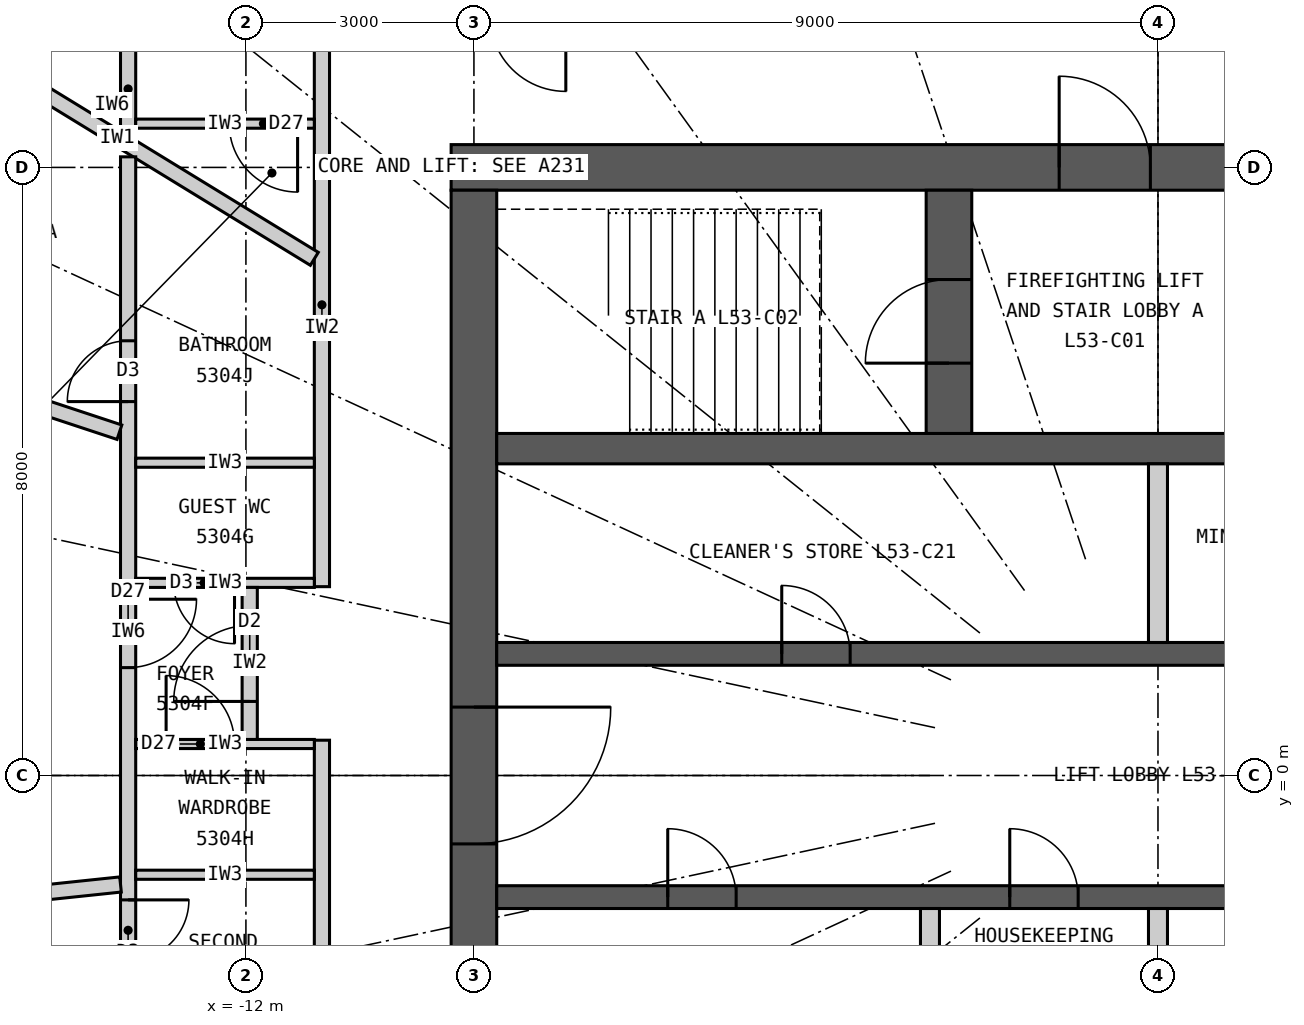
"""IFC4 building model, lengths in metres.
Left out: names, types, materials, properties, quantities, classifications, styles, units other than length and angle.
Written with IfcOpenShell. Run it as: python <this file> out.ifc"""

import sys

from ifc_helpers import new_model, si_unit, direction, frame, frame_2d, origin, place, context, subcontext, project, spatial, rectangle, extrude, element, fill, save


model = new_model("IFC4")
c1 = context("Model", 3, precision=1e-05, world=origin(), true_north=direction((0.0, 1.0)))
c2 = subcontext(c1, "Body", "Model", "MODEL_VIEW")
j1 = project(units=[si_unit("LENGTHUNIT", "METRE"), si_unit("PLANEANGLEUNIT", "RADIAN")], contexts=[c1])
p1 = place(None, origin())
s1 = spatial("IfcSite", under=j1, at=p1, CompositionType="ELEMENT")
p2 = place(p1, origin())
s2 = spatial("IfcBuilding", under=s1, at=p2, CompositionType="ELEMENT")
p3 = place(p2, frame((0.0, 0.0, 199.5)))
s3 = spatial("IfcBuildingStorey", under=s2, at=p3, CompositionType="ELEMENT", Elevation=199.5)
p4 = place(p3, frame((-9.3, 8.0, 0.0), z_axis=(0.0, 0.0, 1.0), x_axis=(1.0, 0.0, 0.0)))
e1 = element("IfcWall", 1, at=p4, inside=s3, PredefinedType="SHEAR", context=c2, shape_type="SweptSolid", body=[
    extrude(rectangle(XDim=18.6, YDim=0.6, at=frame_2d((9.3, 0.0))), origin(), (0.0, 0.0, 1.0), 3.3),
])
p5 = place(p4, frame((8.0, 0.0, 0.0)))
e2 = element("IfcOpeningElement", 2, at=p5, cuts=e1, PredefinedType="OPENING", context=c2, shape_type="SweptSolid", body=[
    extrude(rectangle(XDim=1.2, YDim=2.2, at=frame_2d((0.6, 1.1))), frame((0.0, 0.31, 0.0), z_axis=(0.0, -1.0, 0.0), x_axis=(1.0, 0.0, 0.0)), (0.0, 0.0, 1.0), 0.62),
])
p6 = place(p4, frame((15.6, 0.0, 0.0)))
e3 = element("IfcOpeningElement", 3, at=p6, cuts=e1, PredefinedType="OPENING", context=c2, shape_type="SweptSolid", body=[
    extrude(rectangle(XDim=0.9, YDim=2.2, at=frame_2d((0.45, 1.1))), frame((0.0, 0.31, 0.0), z_axis=(0.0, -1.0, 0.0), x_axis=(1.0, 0.0, 0.0)), (0.0, 0.0, 1.0), 0.62),
])
p7 = place(p3, frame((-9.0, 7.7, 0.0), z_axis=(0.0, 0.0, 1.0), x_axis=(0.0, -1.0, 0.0)))
e4 = element("IfcWall", 4, at=p7, inside=s3, PredefinedType="SHEAR", context=c2, shape_type="SweptSolid", body=[
    extrude(rectangle(XDim=15.4, YDim=0.6, at=frame_2d((7.7, 0.0))), origin(), (0.0, 0.0, 1.0), 3.3),
])
p8 = place(p7, frame((6.8, 0.0, 0.0)))
e5 = element("IfcOpeningElement", 5, at=p8, cuts=e4, PredefinedType="OPENING", context=c2, shape_type="SweptSolid", body=[
    extrude(rectangle(XDim=1.8, YDim=2.2, at=frame_2d((0.9, 1.1))), frame((0.0, 0.31, 0.0), z_axis=(0.0, -1.0, 0.0), x_axis=(1.0, 0.0, 0.0)), (0.0, 0.0, 1.0), 0.62),
])
p9 = place(p3, frame((-8.7, 4.3, 0.0), z_axis=(0.0, 0.0, 1.0), x_axis=(1.0, 0.0, 0.0)))
e6 = element("IfcWall", 6, at=p9, inside=s3, PredefinedType="SHEAR", context=c2, shape_type="SweptSolid", body=[
    extrude(rectangle(XDim=17.4, YDim=0.4, at=frame_2d((8.7, 0.0))), origin(), (0.0, 0.0, 1.0), 3.3),
])
p10 = place(p3, frame((-8.7, 1.6, 0.0), z_axis=(0.0, 0.0, 1.0), x_axis=(1.0, 0.0, 0.0)))
e7 = element("IfcWall", 7, at=p10, inside=s3, PredefinedType="SHEAR", context=c2, shape_type="SweptSolid", body=[
    extrude(rectangle(XDim=17.4, YDim=0.3, at=frame_2d((8.7, 0.0))), origin(), (0.0, 0.0, 1.0), 3.3),
])
p11 = place(p10, frame((12.65, 0.0, 0.0)))
e8 = element("IfcOpeningElement", 8, at=p11, cuts=e7, PredefinedType="OPENING", context=c2, shape_type="SweptSolid", body=[
    extrude(rectangle(XDim=1.1, YDim=2.2, at=frame_2d((0.55, 1.1))), frame((0.0, 0.16, 0.0), z_axis=(0.0, -1.0, 0.0), x_axis=(1.0, 0.0, 0.0)), (0.0, 0.0, 1.0), 0.32),
])
p12 = place(p10, frame((3.75, 0.0, 0.0)))
e9 = element("IfcOpeningElement", 9, at=p12, cuts=e7, PredefinedType="OPENING", context=c2, shape_type="SweptSolid", body=[
    extrude(rectangle(XDim=0.9, YDim=2.2, at=frame_2d((0.45, 1.1))), frame((0.0, 0.16, 0.0), z_axis=(0.0, -1.0, 0.0), x_axis=(1.0, 0.0, 0.0)), (0.0, 0.0, 1.0), 0.32),
])
p13 = place(p10, frame((9.75, 0.0, 0.0)))
e10 = element("IfcOpeningElement", 10, at=p13, cuts=e7, PredefinedType="OPENING", context=c2, shape_type="SweptSolid", body=[
    extrude(rectangle(XDim=0.9, YDim=2.2, at=frame_2d((0.45, 1.1))), frame((0.0, 0.16, 0.0), z_axis=(0.0, -1.0, 0.0), x_axis=(1.0, 0.0, 0.0)), (0.0, 0.0, 1.0), 0.32),
])
p14 = place(p3, frame((-8.7, -1.6, 0.0), z_axis=(0.0, 0.0, 1.0), x_axis=(1.0, 0.0, 0.0)))
e11 = element("IfcWall", 11, at=p14, inside=s3, PredefinedType="SHEAR", context=c2, shape_type="SweptSolid", body=[
    extrude(rectangle(XDim=17.4, YDim=0.3, at=frame_2d((8.7, 0.0))), origin(), (0.0, 0.0, 1.0), 3.3),
])
p15 = place(p14, frame((9.65, 0.0, 0.0)))
e12 = element("IfcOpeningElement", 12, at=p15, cuts=e11, PredefinedType="OPENING", context=c2, shape_type="SweptSolid", body=[
    extrude(rectangle(XDim=1.1, YDim=2.2, at=frame_2d((0.55, 1.1))), frame((0.0, 0.16, 0.0), z_axis=(0.0, -1.0, 0.0), x_axis=(1.0, 0.0, 0.0)), (0.0, 0.0, 1.0), 0.32),
])
p16 = place(p14, frame((12.4, 0.0, 0.0)))
e13 = element("IfcOpeningElement", 13, at=p16, cuts=e11, PredefinedType="OPENING", context=c2, shape_type="SweptSolid", body=[
    extrude(rectangle(XDim=1.6, YDim=2.4, at=frame_2d((0.8, 1.2))), frame((0.0, 0.16, 0.0), z_axis=(0.0, -1.0, 0.0), x_axis=(1.0, 0.0, 0.0)), (0.0, 0.0, 1.0), 0.32),
])
p17 = place(p14, frame((2.25, 0.0, 0.0)))
e14 = element("IfcOpeningElement", 14, at=p17, cuts=e11, PredefinedType="OPENING", context=c2, shape_type="SweptSolid", body=[
    extrude(rectangle(XDim=0.9, YDim=2.2, at=frame_2d((0.45, 1.1))), frame((0.0, 0.16, 0.0), z_axis=(0.0, -1.0, 0.0), x_axis=(1.0, 0.0, 0.0)), (0.0, 0.0, 1.0), 0.32),
])
p18 = place(p14, frame((6.75, 0.0, 0.0)))
e15 = element("IfcOpeningElement", 15, at=p18, cuts=e11, PredefinedType="OPENING", context=c2, shape_type="SweptSolid", body=[
    extrude(rectangle(XDim=0.9, YDim=2.2, at=frame_2d((0.45, 1.1))), frame((0.0, 0.16, 0.0), z_axis=(0.0, -1.0, 0.0), x_axis=(1.0, 0.0, 0.0)), (0.0, 0.0, 1.0), 0.32),
])
p19 = place(p3, frame((-2.75, 4.5, 0.0), z_axis=(0.0, 0.0, 1.0), x_axis=(0.0, 1.0, 0.0)))
e16 = element("IfcWall", 16, at=p19, inside=s3, PredefinedType="SHEAR", context=c2, shape_type="SweptSolid", body=[
    extrude(rectangle(XDim=3.2, YDim=0.6, at=frame_2d((1.6, 0.0))), origin(), (0.0, 0.0, 1.0), 3.3),
])
p20 = place(p19, frame((0.925, 0.0, 0.0)))
e17 = element("IfcOpeningElement", 17, at=p20, cuts=e16, PredefinedType="OPENING", context=c2, shape_type="SweptSolid", body=[
    extrude(rectangle(XDim=1.1, YDim=2.2, at=frame_2d((0.55, 1.1))), frame((0.0, 0.31, 0.0), z_axis=(0.0, -1.0, 0.0), x_axis=(1.0, 0.0, 0.0)), (0.0, 0.0, 1.0), 0.62),
])
for number, where, z_axis, x_axis in (
    (18, (0.0, 1.75, 0.0), (0.0, 0.0, 1.0), (0.0, 1.0, 0.0)),
    (19, (-3.0, -4.1, 0.0), (0.0, 0.0, 1.0), (0.0, 1.0, 0.0)),
    (20, (0.0, -4.1, 0.0), (0.0, 0.0, 1.0), (0.0, 1.0, 0.0)),
):
    element("IfcWall", number, at=place(p3, frame(where, z_axis=z_axis, x_axis=x_axis)), inside=s3, PredefinedType="PARTITIONING", context=c2, shape_type="SweptSolid", body=[
        extrude(rectangle(XDim=2.35, YDim=0.25, at=frame_2d((1.175, 0.0))), origin(), (0.0, 0.0, 1.0), 3.3),
    ])
p21 = place(p3, frame((-11.0, 9.9, 0.0), z_axis=(0.0, 0.0, 1.0), x_axis=(0.0, -1.0, 0.0)))
e21 = element("IfcWall", 21, at=p21, inside=s3, PredefinedType="PARTITIONING", context=c2, shape_type="SweptSolid", body=[
    extrude(rectangle(XDim=7.416, YDim=0.2, at=frame_2d((3.708, 0.0))), origin(), (0.0, 0.0, 1.0), 3.12),
])
p22 = place(p3, frame((-11.0, 0.464, 0.0), z_axis=(0.0, 0.0, 1.0), x_axis=(0.0, -1.0, 0.0)))
e22 = element("IfcWall", 22, at=p22, inside=s3, PredefinedType="PARTITIONING", context=c2, shape_type="SweptSolid", body=[
    extrude(rectangle(XDim=10.364, YDim=0.2, at=frame_2d((5.182, 0.0))), origin(), (0.0, 0.0, 1.0), 3.12),
])
p23 = place(p3, frame((-11.1, 6.797, 0.0), z_axis=(0.0, 0.0, 1.0), x_axis=(-0.852799818179, 0.522237943963, 0.0)))
e23 = element("IfcWall", 23, at=p23, inside=s3, PredefinedType="PARTITIONING", context=c2, shape_type="SweptSolid", body=[
    extrude(rectangle(XDim=6.077, YDim=0.2, at=frame_2d((3.039, 0.0))), origin(), (0.0, 0.0, 1.0), 3.12),
])
p24 = place(p3, frame((-13.55, 9.609, 0.0), z_axis=(0.0, 0.0, 1.0), x_axis=(0.0, -1.0, 0.0)))
e24 = element("IfcWall", 24, at=p24, inside=s3, PredefinedType="PARTITIONING", context=c2, shape_type="SweptSolid", body=[
    extrude(rectangle(XDim=1.153, YDim=0.2, at=frame_2d((0.576, 0.0))), origin(), (0.0, 0.0, 1.0), 3.12),
])
p25 = place(p3, frame((-11.1, 8.576, 0.0), z_axis=(0.0, 0.0, 1.0), x_axis=(-1.0, 0.0, 0.0)))
e25 = element("IfcWall", 25, at=p25, inside=s3, PredefinedType="PARTITIONING", context=c2, shape_type="SweptSolid", body=[
    extrude(rectangle(XDim=2.35, YDim=0.12, at=frame_2d((1.175, 0.0))), origin(), (0.0, 0.0, 1.0), 3.12),
])
p26 = place(p25, frame((0.22, 0.0, 0.0)))
e26 = element("IfcOpeningElement", 26, at=p26, cuts=e25, PredefinedType="OPENING", context=c2, shape_type="SweptSolid", body=[
    extrude(rectangle(XDim=0.9, YDim=2.1, at=frame_2d((0.45, 1.05))), frame((0.0, 0.07, 0.0), z_axis=(0.0, -1.0, 0.0), x_axis=(1.0, 0.0, 0.0)), (0.0, 0.0, 1.0), 0.14),
])
p27 = place(p3, frame((-13.55, 8.139, 0.0), z_axis=(0.0, 0.0, 1.0), x_axis=(0.0, -1.0, 0.0)))
e27 = element("IfcWall", 27, at=p27, inside=s3, PredefinedType="PARTITIONING", context=c2, shape_type="SweptSolid", body=[
    extrude(rectangle(XDim=12.496, YDim=0.2, at=frame_2d((6.248, 0.0))), origin(), (0.0, 0.0, 1.0), 3.12),
])
p28 = place(p27, frame((2.42, 0.0, 0.0)))
e28 = element("IfcOpeningElement", 28, at=p28, cuts=e27, PredefinedType="OPENING", context=c2, shape_type="SweptSolid", body=[
    extrude(rectangle(XDim=0.8, YDim=2.1, at=frame_2d((0.4, 1.05))), frame((0.0, 0.11, 0.0), z_axis=(0.0, -1.0, 0.0), x_axis=(1.0, 0.0, 0.0)), (0.0, 0.0, 1.0), 0.22),
])
p29 = place(p27, frame((9.776, 0.0, 0.0)))
e29 = element("IfcOpeningElement", 29, at=p29, cuts=e27, PredefinedType="OPENING", context=c2, shape_type="SweptSolid", body=[
    extrude(rectangle(XDim=0.8, YDim=2.1, at=frame_2d((0.4, 1.05))), frame((0.0, 0.11, 0.0), z_axis=(0.0, -1.0, 0.0), x_axis=(1.0, 0.0, 0.0)), (0.0, 0.0, 1.0), 0.22),
])
p30 = place(p27, frame((5.82, 0.0, 0.0)))
e30 = element("IfcOpeningElement", 30, at=p30, cuts=e27, PredefinedType="OPENING", context=c2, shape_type="SweptSolid", body=[
    extrude(rectangle(XDim=0.9, YDim=2.1, at=frame_2d((0.45, 1.05))), frame((0.0, 0.11, 0.0), z_axis=(0.0, -1.0, 0.0), x_axis=(1.0, 0.0, 0.0)), (0.0, 0.0, 1.0), 0.22),
])
p31 = place(p3, frame((-13.664, 4.516, 0.0), z_axis=(0.0, 0.0, 1.0), x_axis=(-0.949481375941, 0.313823384632, 0.0)))
e31 = element("IfcWall", 31, at=p31, inside=s3, PredefinedType="PARTITIONING", context=c2, shape_type="SweptSolid", body=[
    extrude(rectangle(XDim=5.638, YDim=0.2, at=frame_2d((2.819, 0.0))), origin(), (0.0, 0.0, 1.0), 3.12),
])
p32 = place(p31, frame((1.82, 0.0, 0.0)))
e32 = element("IfcOpeningElement", 32, at=p32, cuts=e31, PredefinedType="OPENING", context=c2, shape_type="SweptSolid", body=[
    extrude(rectangle(XDim=0.9, YDim=2.1, at=frame_2d((0.45, 1.05))), frame((0.0, 0.11, 0.0), z_axis=(0.0, -1.0, 0.0), x_axis=(1.0, 0.0, 0.0)), (0.0, 0.0, 1.0), 0.22),
])
p33 = place(p3, frame((-13.65, -1.434, 0.0), z_axis=(0.0, 0.0, 1.0), x_axis=(-0.994526954268, -0.10448031984, 0.0)))
e33 = element("IfcWall", 33, at=p33, inside=s3, PredefinedType="PARTITIONING", context=c2, shape_type="SweptSolid", body=[
    extrude(rectangle(XDim=6.837, YDim=0.2, at=frame_2d((3.418, 0.0))), origin(), (0.0, 0.0, 1.0), 2.47),
])
p34 = place(p33, frame((2.27, 0.0, 0.0)))
e34 = element("IfcOpeningElement", 34, at=p34, cuts=e33, PredefinedType="OPENING", context=c2, shape_type="SweptSolid", body=[
    extrude(rectangle(XDim=0.9, YDim=2.1, at=frame_2d((0.45, 1.05))), frame((0.0, 0.11, 0.0), z_axis=(0.0, -1.0, 0.0), x_axis=(1.0, 0.0, 0.0)), (0.0, 0.0, 1.0), 0.22),
])
p35 = place(p3, frame((-11.1, 4.115, 0.0), z_axis=(0.0, 0.0, 1.0), x_axis=(-1.0, 0.0, 0.0)))
e35 = element("IfcWall", 35, at=p35, inside=s3, PredefinedType="PARTITIONING", context=c2, shape_type="SweptSolid", body=[
    extrude(rectangle(XDim=2.35, YDim=0.12, at=frame_2d((1.175, 0.0))), origin(), (0.0, 0.0, 1.0), 3.12),
])
p36 = place(p3, frame((-11.1, 2.534, 0.0), z_axis=(0.0, 0.0, 1.0), x_axis=(-1.0, 0.0, 0.0)))
e36 = element("IfcWall", 36, at=p36, inside=s3, PredefinedType="PARTITIONING", context=c2, shape_type="SweptSolid", body=[
    extrude(rectangle(XDim=2.35, YDim=0.12, at=frame_2d((1.175, 0.0))), origin(), (0.0, 0.0, 1.0), 3.12),
])
p37 = place(p36, frame((1.05, 0.0, 0.0)))
e37 = element("IfcOpeningElement", 37, at=p37, cuts=e36, PredefinedType="OPENING", context=c2, shape_type="SweptSolid", body=[
    extrude(rectangle(XDim=0.8, YDim=2.1, at=frame_2d((0.4, 1.05))), frame((0.0, 0.07, 0.0), z_axis=(0.0, -1.0, 0.0), x_axis=(1.0, 0.0, 0.0)), (0.0, 0.0, 1.0), 0.14),
])
p38 = place(p3, frame((-11.1, 0.414, 0.0), z_axis=(0.0, 0.0, 1.0), x_axis=(-1.0, 0.0, 0.0)))
e38 = element("IfcWall", 38, at=p38, inside=s3, PredefinedType="PARTITIONING", context=c2, shape_type="SweptSolid", body=[
    extrude(rectangle(XDim=2.35, YDim=0.12, at=frame_2d((1.175, 0.0))), origin(), (0.0, 0.0, 1.0), 3.12),
])
p39 = place(p38, frame((1.05, 0.0, 0.0)))
e39 = element("IfcOpeningElement", 39, at=p39, cuts=e38, PredefinedType="OPENING", context=c2, shape_type="SweptSolid", body=[
    extrude(rectangle(XDim=0.9, YDim=2.1, at=frame_2d((0.45, 1.05))), frame((0.0, 0.07, 0.0), z_axis=(0.0, -1.0, 0.0), x_axis=(1.0, 0.0, 0.0)), (0.0, 0.0, 1.0), 0.14),
])
p40 = place(p3, frame((-11.1, -1.306, 0.0), z_axis=(0.0, 0.0, 1.0), x_axis=(-1.0, 0.0, 0.0)))
e40 = element("IfcWall", 40, at=p40, inside=s3, PredefinedType="PARTITIONING", context=c2, shape_type="SweptSolid", body=[
    extrude(rectangle(XDim=2.35, YDim=0.12, at=frame_2d((1.175, 0.0))), origin(), (0.0, 0.0, 1.0), 3.12),
])
p41 = place(p3, frame((-11.95, 2.474, 0.0), z_axis=(0.0, 0.0, 1.0), x_axis=(0.0, -1.0, 0.0)))
e41 = element("IfcWall", 41, at=p41, inside=s3, PredefinedType="PARTITIONING", context=c2, shape_type="SweptSolid", body=[
    extrude(rectangle(XDim=2.0, YDim=0.2, at=frame_2d((1.0, 0.0))), origin(), (0.0, 0.0, 1.0), 3.12),
])
p42 = place(p41, frame((0.5, 0.0, 0.0)))
e42 = element("IfcOpeningElement", 42, at=p42, cuts=e41, PredefinedType="OPENING", context=c2, shape_type="SweptSolid", body=[
    extrude(rectangle(XDim=1.0, YDim=2.2, at=frame_2d((0.5, 1.1))), frame((0.0, 0.11, 0.0), z_axis=(0.0, -1.0, 0.0), x_axis=(1.0, 0.0, 0.0)), (0.0, 0.0, 1.0), 0.22),
])
p43 = place(p26, origin())
e43 = element("IfcDoor", 43, at=p43, inside=s3, OperationType="SINGLE_SWING_LEFT", PredefinedType="DOOR", context=c2, shape_type="SweptSolid", body=[
    extrude(rectangle(XDim=0.9, YDim=2.1, at=frame_2d((0.45, 1.05))), frame((0.0, 0.025, 0.0), z_axis=(0.0, -1.0, 0.0), x_axis=(1.0, 0.0, 0.0)), (0.0, 0.0, 1.0), 0.05),
])
fill(e26, e43)
p44 = place(p42, origin())
e44 = element("IfcDoor", 44, at=p44, inside=s3, OperationType="SINGLE_SWING_RIGHT", PredefinedType="DOOR", context=c2, shape_type="SweptSolid", body=[
    extrude(rectangle(XDim=1.0, YDim=2.2, at=frame_2d((0.5, 1.1))), frame((0.0, 0.025, 0.0), z_axis=(0.0, -1.0, 0.0), x_axis=(1.0, 0.0, 0.0)), (0.0, 0.0, 1.0), 0.05),
])
fill(e42, e44)
p45 = place(p28, origin())
e45 = element("IfcDoor", 45, at=p45, inside=s3, OperationType="SINGLE_SWING_RIGHT", PredefinedType="DOOR", context=c2, shape_type="SweptSolid", body=[
    extrude(rectangle(XDim=0.8, YDim=2.1, at=frame_2d((0.4, 1.05))), frame((0.0, 0.025, 0.0), z_axis=(0.0, -1.0, 0.0), x_axis=(1.0, 0.0, 0.0)), (0.0, 0.0, 1.0), 0.05),
])
fill(e28, e45)
p46 = place(p37, origin())
e46 = element("IfcDoor", 46, at=p46, inside=s3, OperationType="SINGLE_SWING_LEFT", PredefinedType="DOOR", context=c2, shape_type="SweptSolid", body=[
    extrude(rectangle(XDim=0.8, YDim=2.1, at=frame_2d((0.4, 1.05))), frame((0.0, 0.025, 0.0), z_axis=(0.0, -1.0, 0.0), x_axis=(1.0, 0.0, 0.0)), (0.0, 0.0, 1.0), 0.05),
])
fill(e37, e46)
p47 = place(p39, origin())
e47 = element("IfcDoor", 47, at=p47, inside=s3, OperationType="SINGLE_SWING_RIGHT", PredefinedType="DOOR", context=c2, shape_type="SweptSolid", body=[
    extrude(rectangle(XDim=0.9, YDim=2.1, at=frame_2d((0.45, 1.05))), frame((0.0, 0.025, 0.0), z_axis=(0.0, -1.0, 0.0), x_axis=(1.0, 0.0, 0.0)), (0.0, 0.0, 1.0), 0.05),
])
fill(e39, e47)
p48 = place(p29, origin())
e48 = element("IfcDoor", 48, at=p48, inside=s3, OperationType="SINGLE_SWING_LEFT", PredefinedType="DOOR", context=c2, shape_type="SweptSolid", body=[
    extrude(rectangle(XDim=0.8, YDim=2.1, at=frame_2d((0.4, 1.05))), frame((0.0, 0.025, 0.0), z_axis=(0.0, -1.0, 0.0), x_axis=(1.0, 0.0, 0.0)), (0.0, 0.0, 1.0), 0.05),
])
fill(e29, e48)
p49 = place(p30, origin())
e49 = element("IfcDoor", 49, at=p49, inside=s3, OperationType="SINGLE_SWING_LEFT", PredefinedType="DOOR", context=c2, shape_type="SweptSolid", body=[
    extrude(rectangle(XDim=0.9, YDim=2.1, at=frame_2d((0.45, 1.05))), frame((0.0, 0.025, 0.0), z_axis=(0.0, -1.0, 0.0), x_axis=(1.0, 0.0, 0.0)), (0.0, 0.0, 1.0), 0.05),
])
fill(e30, e49)
p50 = place(p5, origin())
e50 = element("IfcDoor", 50, at=p50, inside=s3, OperationType="SINGLE_SWING_LEFT", PredefinedType="DOOR", context=c2, shape_type="SweptSolid", body=[
    extrude(rectangle(XDim=1.2, YDim=2.2, at=frame_2d((0.6, 1.1))), frame((0.0, 0.025, 0.0), z_axis=(0.0, -1.0, 0.0), x_axis=(1.0, 0.0, 0.0)), (0.0, 0.0, 1.0), 0.05),
])
fill(e2, e50)
p51 = place(p20, origin())
e51 = element("IfcDoor", 51, at=p51, inside=s3, OperationType="SINGLE_SWING_LEFT", PredefinedType="DOOR", context=c2, shape_type="SweptSolid", body=[
    extrude(rectangle(XDim=1.1, YDim=2.2, at=frame_2d((0.55, 1.1))), frame((0.0, 0.025, 0.0), z_axis=(0.0, -1.0, 0.0), x_axis=(1.0, 0.0, 0.0)), (0.0, 0.0, 1.0), 0.05),
])
fill(e17, e51)
p52 = place(p12, origin())
e52 = element("IfcDoor", 52, at=p52, inside=s3, OperationType="SINGLE_SWING_LEFT", PredefinedType="DOOR", context=c2, shape_type="SweptSolid", body=[
    extrude(rectangle(XDim=0.9, YDim=2.2, at=frame_2d((0.45, 1.1))), frame((0.0, 0.025, 0.0), z_axis=(0.0, -1.0, 0.0), x_axis=(1.0, 0.0, 0.0)), (0.0, 0.0, 1.0), 0.05),
])
fill(e9, e52)
p53 = place(p17, origin())
e53 = element("IfcDoor", 53, at=p53, inside=s3, OperationType="SINGLE_SWING_LEFT", PredefinedType="DOOR", context=c2, shape_type="SweptSolid", body=[
    extrude(rectangle(XDim=0.9, YDim=2.2, at=frame_2d((0.45, 1.1))), frame((0.0, 0.025, 0.0), z_axis=(0.0, -1.0, 0.0), x_axis=(1.0, 0.0, 0.0)), (0.0, 0.0, 1.0), 0.05),
])
fill(e14, e53)
p54 = place(p18, origin())
e54 = element("IfcDoor", 54, at=p54, inside=s3, OperationType="SINGLE_SWING_LEFT", PredefinedType="DOOR", context=c2, shape_type="SweptSolid", body=[
    extrude(rectangle(XDim=0.9, YDim=2.2, at=frame_2d((0.45, 1.1))), frame((0.0, 0.025, 0.0), z_axis=(0.0, -1.0, 0.0), x_axis=(1.0, 0.0, 0.0)), (0.0, 0.0, 1.0), 0.05),
])
fill(e15, e54)
p55 = place(p8, origin())
e55 = element("IfcDoor", 55, at=p55, inside=s3, OperationType="DOUBLE_DOOR_DOUBLE_SWING", PredefinedType="DOOR", context=c2, shape_type="SweptSolid", body=[
    extrude(rectangle(XDim=1.8, YDim=2.2, at=frame_2d((0.9, 1.1))), frame((0.0, 0.025, 0.0), z_axis=(0.0, -1.0, 0.0), x_axis=(1.0, 0.0, 0.0)), (0.0, 0.0, 1.0), 0.05),
])
fill(e5, e55)
save(model, sys.argv[1])
